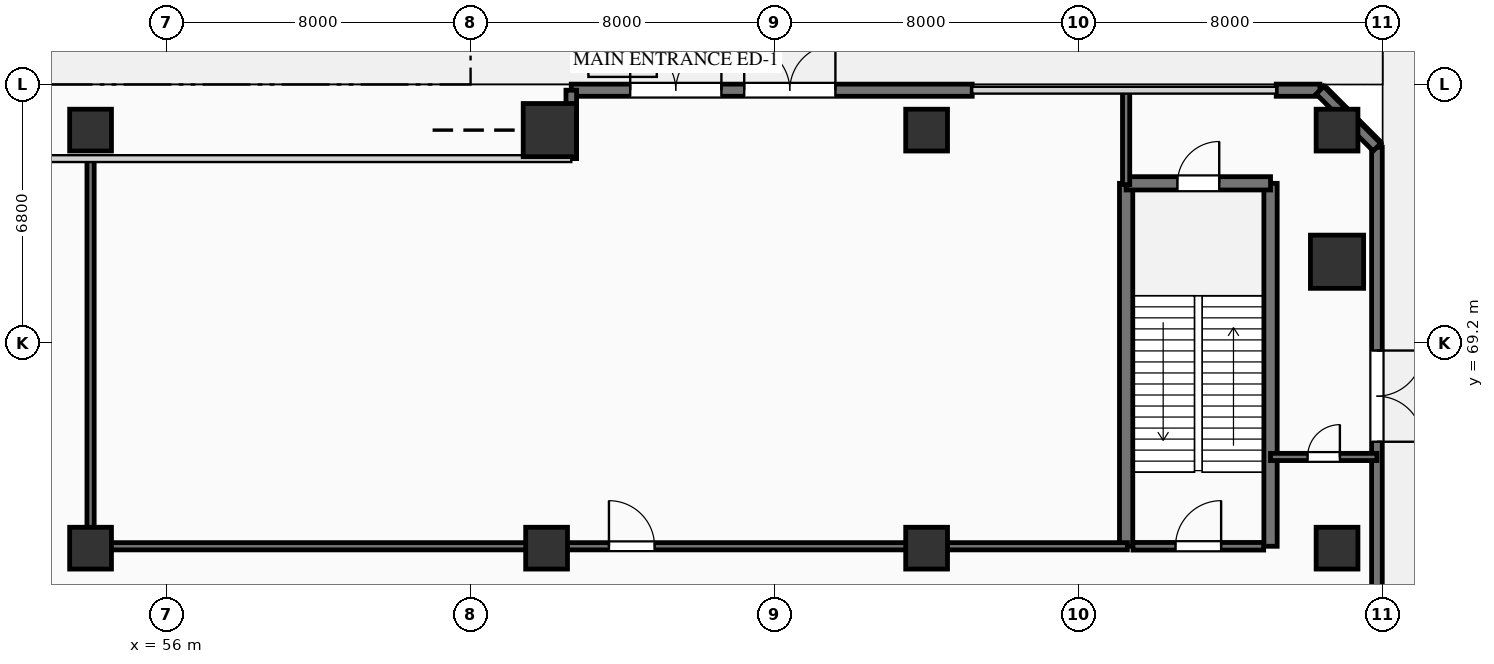
"""IFC4 building model, lengths in metres.
Left out: names, types, materials, properties, quantities, classifications, styles, units other than length and angle.
Written with IfcOpenShell. Run it as: python <this file> out.ifc"""

import sys

from ifc_helpers import new_model, si_unit, direction, frame, frame_2d, origin, origin_2d, place, context, subcontext, project, spatial, rectangle, extrude, element, fill, save


model = new_model("IFC4")
c1 = context("Model", 3, precision=1e-05, world=origin(), true_north=direction((0.0, 1.0)))
c2 = subcontext(c1, "Body", "Model", "MODEL_VIEW")
j1 = project(units=[si_unit("LENGTHUNIT", "METRE"), si_unit("PLANEANGLEUNIT", "RADIAN")], contexts=[c1])
p1 = place(None, origin())
s1 = spatial("IfcSite", under=j1, at=p1, CompositionType="ELEMENT")
p2 = place(p1, origin())
s2 = spatial("IfcBuilding", under=s1, at=p2, CompositionType="ELEMENT")
p3 = place(p2, origin())
s3 = spatial("IfcBuildingStorey", under=s2, at=p3, CompositionType="ELEMENT", Elevation=0.0)
for number, where, z_axis, x_axis in (
    (1, (54.0, 74.8, 0.0), (0.0, 0.0, 1.0), (1.0, 0.0, 0.0)),
    (2, (54.0, 63.8, 0.0), (0.0, 0.0, 1.0), (1.0, 0.0, 0.0)),
    (3, (66.0, 63.8, 0.0), (0.0, 0.0, 1.0), (1.0, 0.0, 0.0)),
    (4, (76.0, 74.8, 0.0), (0.0, 0.0, 1.0), (1.0, 0.0, 0.0)),
    (5, (76.0, 63.8, 0.0), (0.0, 0.0, 1.0), (1.0, 0.0, 0.0)),
    (6, (86.8, 74.8, 0.0), (0.0, 0.0, 1.0), (1.0, 0.0, 0.0)),
    (7, (86.8, 63.8, 0.0), (0.0, 0.0, 1.0), (1.0, 0.0, 0.0)),
):
    element("IfcColumn", number, at=place(p3, frame(where, z_axis=z_axis, x_axis=x_axis)), inside=s3, PredefinedType="COLUMN", context=c2, shape_type="SweptSolid", body=[
        extrude(rectangle(XDim=1.1, YDim=1.1, at=origin_2d()), origin(), (0.0, 0.0, 1.0), 5.72),
    ])
for number, where, z_axis, x_axis in (
    (8, (86.8, 71.337, 0.0), (0.0, 0.0, 1.0), (1.0, 0.0, 0.0)),
    (9, (66.084, 74.8, 0.0), (0.0, 0.0, 1.0), (1.0, 0.0, 0.0)),
):
    element("IfcColumn", number, at=place(p3, frame(where, z_axis=z_axis, x_axis=x_axis)), inside=s3, PredefinedType="COLUMN", context=c2, shape_type="SweptSolid", body=[
        extrude(rectangle(XDim=1.4, YDim=1.4, at=origin_2d()), origin(), (0.0, 0.0, 1.0), 5.72),
    ])
for number, where, z_axis, x_axis in (
    (10, (81.25, 63.85, 0.0), (0.0, 0.0, 1.0), (0.0, 1.0, 0.0)),
    (11, (85.05, 63.85, 0.0), (0.0, 0.0, 1.0), (0.0, 1.0, 0.0)),
):
    element("IfcWall", number, at=place(p3, frame(where, z_axis=z_axis, x_axis=x_axis)), inside=s3, PredefinedType="SHEAR", context=c2, shape_type="SweptSolid", body=[
        extrude(rectangle(XDim=9.55, YDim=0.35, at=frame_2d((4.775, 0.0))), origin(), (0.0, 0.0, 1.0), 5.72),
    ])
p4 = place(p3, frame((81.25, 73.4, 0.0), z_axis=(0.0, 0.0, 1.0), x_axis=(1.0, 0.0, 0.0)))
e12 = element("IfcWall", 12, at=p4, inside=s3, PredefinedType="SHEAR", context=c2, shape_type="SweptSolid", body=[
    extrude(rectangle(XDim=3.8, YDim=0.35, at=frame_2d((1.9, 0.0))), origin(), (0.0, 0.0, 1.0), 5.72),
])
p5 = place(p4, frame((1.35, 0.0, 0.0)))
e13 = element("IfcOpeningElement", 13, at=p5, cuts=e12, PredefinedType="OPENING", context=c2, shape_type="SweptSolid", body=[
    extrude(rectangle(XDim=1.1, YDim=2.15, at=frame_2d((0.55, 1.075))), frame((0.0, 0.185, 0.0), z_axis=(0.0, -1.0, 0.0), x_axis=(1.0, 0.0, 0.0)), (0.0, 0.0, 1.0), 0.37),
])
p6 = place(p3, frame((86.35, 75.85, 0.0), z_axis=(0.0, 0.0, 1.0), x_axis=(-1.0, 0.0, 0.0)))
e14 = element("IfcWall", 14, at=p6, inside=s3, PredefinedType="SOLIDWALL", context=c2, shape_type="SweptSolid", body=[
    extrude(rectangle(XDim=1.15, YDim=0.32, at=frame_2d((0.575, 0.0))), origin(), (0.0, 0.0, 1.0), 5.72),
])
p7 = place(p3, frame((66.65, 75.85, 0.0), z_axis=(0.0, 0.0, 1.0), x_axis=(1.0, 0.0, 0.0)))
e15 = element("IfcWall", 15, at=p7, inside=s3, PredefinedType="SOLIDWALL", context=c2, shape_type="SweptSolid", body=[
    extrude(rectangle(XDim=10.55, YDim=0.32, at=frame_2d((5.275, 0.0))), origin(), (0.0, 0.0, 1.0), 5.72),
])
p8 = place(p7, frame((4.55, 0.0, 0.0)))
e16 = element("IfcOpeningElement", 16, at=p8, cuts=e15, PredefinedType="OPENING", context=c2, shape_type="SweptSolid", body=[
    extrude(rectangle(XDim=2.4, YDim=2.6, at=frame_2d((1.2, 1.3))), frame((0.0, 0.17, 0.0), z_axis=(0.0, -1.0, 0.0), x_axis=(1.0, 0.0, 0.0)), (0.0, 0.0, 1.0), 0.34),
])
p9 = place(p7, frame((1.55, 0.0, 0.0)))
e17 = element("IfcOpeningElement", 17, at=p9, cuts=e15, PredefinedType="OPENING", context=c2, shape_type="SweptSolid", body=[
    extrude(rectangle(XDim=2.4, YDim=2.6, at=frame_2d((1.2, 1.3))), frame((0.0, 0.17, 0.0), z_axis=(0.0, -1.0, 0.0), x_axis=(1.0, 0.0, 0.0)), (0.0, 0.0, 1.0), 0.34),
])
p10 = place(p3, frame((66.65, 75.85, 0.0), z_axis=(0.0, 0.0, 1.0), x_axis=(0.0, -1.0, 0.0)))
e18 = element("IfcWall", 18, at=p10, inside=s3, PredefinedType="SOLIDWALL", context=c2, shape_type="SweptSolid", body=[
    extrude(rectangle(XDim=1.8, YDim=0.28, at=frame_2d((0.9, 0.0))), origin(), (0.0, 0.0, 1.0), 5.72),
])
p11 = place(p3, frame((87.85, 74.35, 0.0), z_axis=(0.0, 0.0, 1.0), x_axis=(0.0, -1.0, 0.0)))
e19 = element("IfcWall", 19, at=p11, inside=s3, PredefinedType="SOLIDWALL", context=c2, shape_type="SweptSolid", body=[
    extrude(rectangle(XDim=41.35, YDim=0.28, at=frame_2d((20.675, 0.0))), origin(), (0.0, 0.0, 1.0), 5.72),
])
p12 = place(p11, frame((5.35, 0.0, 0.0)))
e20 = element("IfcOpeningElement", 20, at=p12, cuts=e19, PredefinedType="OPENING", context=c2, shape_type="SweptSolid", body=[
    extrude(rectangle(XDim=2.4, YDim=2.6, at=frame_2d((1.2, 1.3))), frame((0.0, 0.15, 0.0), z_axis=(0.0, -1.0, 0.0), x_axis=(1.0, 0.0, 0.0)), (0.0, 0.0, 1.0), 0.3),
])
p13 = place(p11, frame((14.15, 0.0, 0.0)))
e21 = element("IfcOpeningElement", 21, at=p13, cuts=e19, PredefinedType="OPENING", context=c2, shape_type="SweptSolid", body=[
    extrude(rectangle(XDim=4.2, YDim=4.2, at=frame_2d((2.1, 2.1))), frame((0.0, 0.15, 0.0), z_axis=(0.0, -1.0, 0.0), x_axis=(1.0, 0.0, 0.0)), (0.0, 0.0, 1.0), 0.3),
])
p14 = place(p11, frame((31.275, 0.0, 0.9)))
e22 = element("IfcOpeningElement", 22, at=p14, cuts=e19, PredefinedType="OPENING", context=c2, shape_type="SweptSolid", body=[
    extrude(rectangle(XDim=2.4, YDim=2.6, at=frame_2d((1.2, 1.3))), frame((0.0, 0.15, 0.0), z_axis=(0.0, -1.0, 0.0), x_axis=(1.0, 0.0, 0.0)), (0.0, 0.0, 1.0), 0.3),
])
p15 = place(p3, frame((87.85, 74.35, 0.0), z_axis=(0.0, 0.0, 1.0), x_axis=(-0.707106781187, 0.707106781187, 0.0)))
e23 = element("IfcWall", 23, at=p15, inside=s3, PredefinedType="SOLIDWALL", context=c2, shape_type="SweptSolid", body=[
    extrude(rectangle(XDim=2.121, YDim=0.28, at=frame_2d((1.061, 0.0))), origin(), (0.0, 0.0, 1.0), 5.72),
])
p16 = place(p3, frame((81.43, 63.85, 0.0), z_axis=(0.0, 0.0, 1.0), x_axis=(1.0, 0.0, 0.0)))
e24 = element("IfcWall", 24, at=p16, inside=s3, PredefinedType="SOLIDWALL", context=c2, shape_type="SweptSolid", body=[
    extrude(rectangle(XDim=3.44, YDim=0.2, at=frame_2d((1.72, 0.0))), origin(), (0.0, 0.0, 1.0), 4.92),
])
p17 = place(p16, frame((1.12, 0.0, 0.0)))
e25 = element("IfcOpeningElement", 25, at=p17, cuts=e24, PredefinedType="OPENING", context=c2, shape_type="SweptSolid", body=[
    extrude(rectangle(XDim=1.2, YDim=2.15, at=frame_2d((0.6, 1.075))), frame((0.0, 0.11, 0.0), z_axis=(0.0, -1.0, 0.0), x_axis=(1.0, 0.0, 0.0)), (0.0, 0.0, 1.0), 0.22),
])
p18 = place(p3, frame((54.0, 63.85, 0.0), z_axis=(0.0, 0.0, 1.0), x_axis=(1.0, 0.0, 0.0)))
e26 = element("IfcWall", 26, at=p18, inside=s3, PredefinedType="PARTITIONING", context=c2, shape_type="SweptSolid", body=[
    extrude(rectangle(XDim=27.282, YDim=0.19, at=frame_2d((13.641, 0.0))), origin(), (0.0, 0.0, 1.0), 4.92),
])
p19 = place(p18, frame((13.641, 0.0, 0.0)))
e27 = element("IfcOpeningElement", 27, at=p19, cuts=e26, PredefinedType="OPENING", context=c2, shape_type="SweptSolid", body=[
    extrude(rectangle(XDim=1.2, YDim=2.25, at=frame_2d((0.6, 1.125))), frame((0.0, 0.105, 0.0), z_axis=(0.0, -1.0, 0.0), x_axis=(1.0, 0.0, 0.0)), (0.0, 0.0, 1.0), 0.21),
])
p20 = place(p3, frame((54.0, 74.05, 0.0), z_axis=(0.0, 0.0, 1.0), x_axis=(0.0, -1.0, 0.0)))
e28 = element("IfcWall", 28, at=p20, inside=s3, PredefinedType="PARTITIONING", context=c2, shape_type="SweptSolid", body=[
    extrude(rectangle(XDim=10.2, YDim=0.19, at=frame_2d((5.1, 0.0))), origin(), (0.0, 0.0, 1.0), 4.92),
])
p21 = place(p3, frame((85.05, 66.2, 0.0), z_axis=(0.0, 0.0, 1.0), x_axis=(1.0, 0.0, 0.0)))
e29 = element("IfcWall", 29, at=p21, inside=s3, PredefinedType="PARTITIONING", context=c2, shape_type="SweptSolid", body=[
    extrude(rectangle(XDim=2.8, YDim=0.19, at=frame_2d((1.4, 0.0))), origin(), (0.0, 0.0, 1.0), 4.92),
])
p22 = place(p21, frame((0.975, 0.0, 0.0)))
e30 = element("IfcOpeningElement", 30, at=p22, cuts=e29, PredefinedType="OPENING", context=c2, shape_type="SweptSolid", body=[
    extrude(rectangle(XDim=0.85, YDim=2.15, at=frame_2d((0.425, 1.075))), frame((0.0, 0.105, 0.0), z_axis=(0.0, -1.0, 0.0), x_axis=(1.0, 0.0, 0.0)), (0.0, 0.0, 1.0), 0.21),
])
p23 = place(p3, frame((81.25, 75.85, 0.0), z_axis=(0.0, 0.0, 1.0), x_axis=(0.0, -1.0, 0.0)))
e31 = element("IfcWall", 31, at=p23, inside=s3, PredefinedType="PARTITIONING", context=c2, shape_type="SweptSolid", body=[
    extrude(rectangle(XDim=2.482, YDim=0.19, at=frame_2d((1.241, 0.0))), origin(), (0.0, 0.0, 1.0), 4.92),
])
p24 = place(p8, origin())
e32 = element("IfcDoor", 32, at=p24, inside=s3, OperationType="DOUBLE_DOOR_SINGLE_SWING", PredefinedType="DOOR", context=c2, shape_type="SweptSolid", body=[
    extrude(rectangle(XDim=2.4, YDim=2.6, at=frame_2d((1.2, 1.3))), frame((0.0, 0.025, 0.0), z_axis=(0.0, -1.0, 0.0), x_axis=(1.0, 0.0, 0.0)), (0.0, 0.0, 1.0), 0.05),
])
fill(e16, e32)
p25 = place(p9, origin())
e33 = element("IfcDoor", 33, at=p25, inside=s3, OperationType="DOUBLE_DOOR_SINGLE_SWING", PredefinedType="DOOR", context=c2, shape_type="SweptSolid", body=[
    extrude(rectangle(XDim=2.4, YDim=2.6, at=frame_2d((1.2, 1.3))), frame((0.0, 0.025, 0.0), z_axis=(0.0, -1.0, 0.0), x_axis=(1.0, 0.0, 0.0)), (0.0, 0.0, 1.0), 0.05),
])
fill(e17, e33)
p26 = place(p12, origin())
e34 = element("IfcDoor", 34, at=p26, inside=s3, OperationType="DOUBLE_DOOR_SINGLE_SWING", PredefinedType="DOOR", context=c2, shape_type="SweptSolid", body=[
    extrude(rectangle(XDim=2.4, YDim=2.6, at=frame_2d((1.2, 1.3))), frame((0.0, 0.025, 0.0), z_axis=(0.0, -1.0, 0.0), x_axis=(1.0, 0.0, 0.0)), (0.0, 0.0, 1.0), 0.05),
])
fill(e20, e34)
p27 = place(p5, origin())
e35 = element("IfcDoor", 35, at=p27, inside=s3, OperationType="SINGLE_SWING_RIGHT", PredefinedType="DOOR", context=c2, shape_type="SweptSolid", body=[
    extrude(rectangle(XDim=1.1, YDim=2.15, at=frame_2d((0.55, 1.075))), frame((0.0, 0.025, 0.0), z_axis=(0.0, -1.0, 0.0), x_axis=(1.0, 0.0, 0.0)), (0.0, 0.0, 1.0), 0.05),
])
fill(e13, e35)
p28 = place(p17, origin())
e36 = element("IfcDoor", 36, at=p28, inside=s3, OperationType="SINGLE_SWING_RIGHT", PredefinedType="DOOR", context=c2, shape_type="SweptSolid", body=[
    extrude(rectangle(XDim=1.2, YDim=2.15, at=frame_2d((0.6, 1.075))), frame((0.0, 0.025, 0.0), z_axis=(0.0, -1.0, 0.0), x_axis=(1.0, 0.0, 0.0)), (0.0, 0.0, 1.0), 0.05),
])
fill(e25, e36)
p29 = place(p19, origin())
e37 = element("IfcDoor", 37, at=p29, inside=s3, OperationType="SINGLE_SWING_LEFT", PredefinedType="DOOR", context=c2, shape_type="SweptSolid", body=[
    extrude(rectangle(XDim=1.2, YDim=2.25, at=frame_2d((0.6, 1.125))), frame((0.0, 0.025, 0.0), z_axis=(0.0, -1.0, 0.0), x_axis=(1.0, 0.0, 0.0)), (0.0, 0.0, 1.0), 0.05),
])
fill(e27, e37)
p30 = place(p22, origin())
e38 = element("IfcDoor", 38, at=p30, inside=s3, OperationType="SINGLE_SWING_RIGHT", PredefinedType="DOOR", context=c2, shape_type="SweptSolid", body=[
    extrude(rectangle(XDim=0.85, YDim=2.15, at=frame_2d((0.425, 1.075))), frame((0.0, 0.025, 0.0), z_axis=(0.0, -1.0, 0.0), x_axis=(1.0, 0.0, 0.0)), (0.0, 0.0, 1.0), 0.05),
])
fill(e30, e38)
save(model, sys.argv[1])
